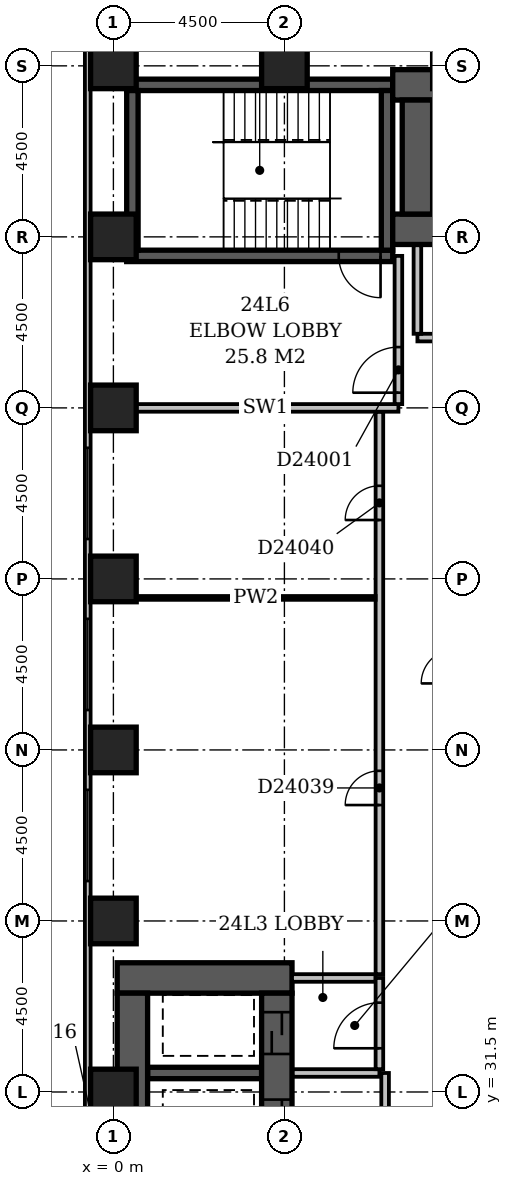
"""IFC4 building model, lengths in metres.
Left out: names, types, materials, properties, quantities, classifications, styles, units other than length and angle.
Written with IfcOpenShell. Run it as: python <this file> out.ifc"""

import sys

from ifc_helpers import new_model, si_unit, direction, frame, frame_2d, origin, origin_2d, place, context, subcontext, project, spatial, rectangle, extrude, element, fill, save


model = new_model("IFC4")
c1 = context("Model", 3, precision=1e-05, world=origin(), true_north=direction((0.0, 1.0)))
c2 = subcontext(c1, "Body", "Model", "MODEL_VIEW")
j1 = project(units=[si_unit("LENGTHUNIT", "METRE"), si_unit("PLANEANGLEUNIT", "RADIAN")], contexts=[c1])
p1 = place(None, origin())
s1 = spatial("IfcSite", under=j1, at=p1, CompositionType="ELEMENT")
p2 = place(p1, origin())
s2 = spatial("IfcBuilding", under=s1, at=p2, CompositionType="ELEMENT")
p3 = place(p2, frame((0.0, 0.0, 97.4)))
s3 = spatial("IfcBuildingStorey", under=s2, at=p3, CompositionType="ELEMENT", Elevation=97.4)
p4 = place(p3, frame((0.1, 34.5, -0.3), z_axis=(0.0, 0.0, 1.0), x_axis=(1.0, 0.0, 0.0)))
e1 = element("IfcWall", 1, at=p4, inside=s3, PredefinedType="SHEAR", context=c2, shape_type="SweptSolid", body=[
    extrude(rectangle(XDim=4.6, YDim=0.8, at=frame_2d((2.3, 0.0))), origin(), (0.0, 0.0, 1.0), 3.6),
])
p5 = place(p3, frame((0.35, 53.5, -0.3), z_axis=(0.0, 0.0, 1.0), x_axis=(1.0, 0.0, 0.0)))
e2 = element("IfcWall", 2, at=p5, inside=s3, PredefinedType="SHEAR", context=c2, shape_type="SweptSolid", body=[
    extrude(rectangle(XDim=7.0, YDim=0.3, at=frame_2d((3.5, 0.0))), origin(), (0.0, 0.0, 1.0), 3.6),
])
p6 = place(p5, frame((5.58, 0.0, 0.3)))
e3 = element("IfcOpeningElement", 3, at=p6, cuts=e2, PredefinedType="OPENING", context=c2, shape_type="SweptSolid", body=[
    extrude(rectangle(XDim=1.1, YDim=2.1, at=frame_2d((0.55, 1.05))), frame((0.0, 0.162, 0.0), z_axis=(0.0, -1.0, 0.0), x_axis=(1.0, 0.0, 0.0)), (0.0, 0.0, 1.0), 0.324),
])
p7 = place(p3, frame((0.35, 58.0, -0.3), z_axis=(0.0, 0.0, 1.0), x_axis=(1.0, 0.0, 0.0)))
e4 = element("IfcWall", 4, at=p7, inside=s3, PredefinedType="SHEAR", context=c2, shape_type="SweptSolid", body=[
    extrude(rectangle(XDim=7.0, YDim=0.3, at=frame_2d((3.5, 0.0))), origin(), (0.0, 0.0, 1.0), 3.6),
])
p8 = place(p3, frame((0.5, 27.15, -0.3), z_axis=(0.0, 0.0, 1.0), x_axis=(0.0, 1.0, 0.0)))
e5 = element("IfcWall", 5, at=p8, inside=s3, PredefinedType="SHEAR", context=c2, shape_type="SweptSolid", body=[
    extrude(rectangle(XDim=6.95, YDim=0.8, at=frame_2d((3.475, 0.0))), origin(), (0.0, 0.0, 1.0), 3.6),
])
p9 = place(p3, frame((0.5, 53.65, -0.3), z_axis=(0.0, 0.0, 1.0), x_axis=(0.0, 1.0, 0.0)))
e6 = element("IfcWall", 6, at=p9, inside=s3, PredefinedType="SHEAR", context=c2, shape_type="SweptSolid", body=[
    extrude(rectangle(XDim=4.2, YDim=0.3, at=frame_2d((2.1, 0.0))), origin(), (0.0, 0.0, 1.0), 3.6),
])
p10 = place(p3, frame((0.9, 32.0, -0.3), z_axis=(0.0, 0.0, 1.0), x_axis=(1.0, 0.0, 0.0)))
e7 = element("IfcWall", 7, at=p10, inside=s3, PredefinedType="SHEAR", context=c2, shape_type="SweptSolid", body=[
    extrude(rectangle(XDim=3.0, YDim=0.3, at=frame_2d((1.5, 0.0))), origin(), (0.0, 0.0, 1.0), 3.6),
])
p11 = place(p3, frame((4.3, 27.15, -0.3), z_axis=(0.0, 0.0, 1.0), x_axis=(0.0, 1.0, 0.0)))
e8 = element("IfcWall", 8, at=p11, inside=s3, PredefinedType="SHEAR", context=c2, shape_type="SweptSolid", body=[
    extrude(rectangle(XDim=6.95, YDim=0.8, at=frame_2d((3.475, 0.0))), origin(), (0.0, 0.0, 1.0), 3.6),
])
p12 = place(p11, frame((3.05, 0.0, 0.3)))
e9 = element("IfcOpeningElement", 9, at=p12, cuts=e8, PredefinedType="OPENING", context=c2, shape_type="SweptSolid", body=[
    extrude(rectangle(XDim=1.1, YDim=2.1, at=frame_2d((0.55, 1.05))), frame((0.0, 0.412, 0.0), z_axis=(0.0, -1.0, 0.0), x_axis=(1.0, 0.0, 0.0)), (0.0, 0.0, 1.0), 0.824),
])
p13 = place(p11, frame((0.55, 0.0, 0.3)))
e10 = element("IfcOpeningElement", 10, at=p13, cuts=e8, PredefinedType="OPENING", context=c2, shape_type="SweptSolid", body=[
    extrude(rectangle(XDim=1.1, YDim=2.1, at=frame_2d((0.55, 1.05))), frame((0.0, 0.412, 0.0), z_axis=(0.0, -1.0, 0.0), x_axis=(1.0, 0.0, 0.0)), (0.0, 0.0, 1.0), 0.824),
])
p14 = place(p11, frame((5.35, 0.0, 0.3)))
e11 = element("IfcOpeningElement", 11, at=p14, cuts=e8, PredefinedType="OPENING", context=c2, shape_type="SweptSolid", body=[
    extrude(rectangle(XDim=1.1, YDim=2.1, at=frame_2d((0.55, 1.05))), frame((0.0, 0.412, 0.0), z_axis=(0.0, -1.0, 0.0), x_axis=(1.0, 0.0, 0.0)), (0.0, 0.0, 1.0), 0.824),
])
p15 = place(p3, frame((7.2, 53.65, -0.3), z_axis=(0.0, 0.0, 1.0), x_axis=(0.0, 1.0, 0.0)))
e12 = element("IfcWall", 12, at=p15, inside=s3, PredefinedType="SHEAR", context=c2, shape_type="SweptSolid", body=[
    extrude(rectangle(XDim=4.2, YDim=0.3, at=frame_2d((2.1, 0.0))), origin(), (0.0, 0.0, 1.0), 3.6),
])
p16 = place(p3, frame((7.35, 54.2, -0.3), z_axis=(0.0, 0.0, 1.0), x_axis=(1.0, 0.0, 0.0)))
e13 = element("IfcWall", 13, at=p16, inside=s3, PredefinedType="SHEAR", context=c2, shape_type="SweptSolid", body=[
    extrude(rectangle(XDim=16.45, YDim=0.8, at=frame_2d((8.225, 0.0))), origin(), (0.0, 0.0, 1.0), 3.6),
])
p17 = place(p16, frame((1.35, 0.0, 0.3)))
e14 = element("IfcOpeningElement", 14, at=p17, cuts=e13, PredefinedType="OPENING", context=c2, shape_type="SweptSolid", body=[
    extrude(rectangle(XDim=1.1, YDim=2.1, at=frame_2d((0.55, 1.05))), frame((0.0, 0.412, 0.0), z_axis=(0.0, -1.0, 0.0), x_axis=(1.0, 0.0, 0.0)), (0.0, 0.0, 1.0), 0.824),
])
p18 = place(p16, frame((3.85, 0.0, 0.3)))
e15 = element("IfcOpeningElement", 15, at=p18, cuts=e13, PredefinedType="OPENING", context=c2, shape_type="SweptSolid", body=[
    extrude(rectangle(XDim=1.1, YDim=2.1, at=frame_2d((0.55, 1.05))), frame((0.0, 0.412, 0.0), z_axis=(0.0, -1.0, 0.0), x_axis=(1.0, 0.0, 0.0)), (0.0, 0.0, 1.0), 0.824),
])
p19 = place(p16, frame((6.35, 0.0, 0.3)))
e16 = element("IfcOpeningElement", 16, at=p19, cuts=e13, PredefinedType="OPENING", context=c2, shape_type="SweptSolid", body=[
    extrude(rectangle(XDim=1.1, YDim=2.1, at=frame_2d((0.55, 1.05))), frame((0.0, 0.412, 0.0), z_axis=(0.0, -1.0, 0.0), x_axis=(1.0, 0.0, 0.0)), (0.0, 0.0, 1.0), 0.824),
])
p20 = place(p16, frame((8.85, 0.0, 0.3)))
e17 = element("IfcOpeningElement", 17, at=p20, cuts=e13, PredefinedType="OPENING", context=c2, shape_type="SweptSolid", body=[
    extrude(rectangle(XDim=1.1, YDim=2.1, at=frame_2d((0.55, 1.05))), frame((0.0, 0.412, 0.0), z_axis=(0.0, -1.0, 0.0), x_axis=(1.0, 0.0, 0.0)), (0.0, 0.0, 1.0), 0.824),
])
p21 = place(p16, frame((11.35, 0.0, 0.3)))
e18 = element("IfcOpeningElement", 18, at=p21, cuts=e13, PredefinedType="OPENING", context=c2, shape_type="SweptSolid", body=[
    extrude(rectangle(XDim=1.1, YDim=2.1, at=frame_2d((0.55, 1.05))), frame((0.0, 0.412, 0.0), z_axis=(0.0, -1.0, 0.0), x_axis=(1.0, 0.0, 0.0)), (0.0, 0.0, 1.0), 0.824),
])
p22 = place(p16, frame((13.85, 0.0, 0.3)))
e19 = element("IfcOpeningElement", 19, at=p22, cuts=e13, PredefinedType="OPENING", context=c2, shape_type="SweptSolid", body=[
    extrude(rectangle(XDim=1.1, YDim=2.1, at=frame_2d((0.55, 1.05))), frame((0.0, 0.412, 0.0), z_axis=(0.0, -1.0, 0.0), x_axis=(1.0, 0.0, 0.0)), (0.0, 0.0, 1.0), 0.824),
])
p23 = place(p3, frame((7.35, 58.0, -0.3), z_axis=(0.0, 0.0, 1.0), x_axis=(1.0, 0.0, 0.0)))
e20 = element("IfcWall", 20, at=p23, inside=s3, PredefinedType="SHEAR", context=c2, shape_type="SweptSolid", body=[
    extrude(rectangle(XDim=16.45, YDim=0.8, at=frame_2d((8.225, 0.0))), origin(), (0.0, 0.0, 1.0), 3.6),
])
p24 = place(p3, frame((8.0, 54.6, -0.3), z_axis=(0.0, 0.0, 1.0), x_axis=(0.0, 1.0, 0.0)))
e21 = element("IfcWall", 21, at=p24, inside=s3, PredefinedType="SHEAR", context=c2, shape_type="SweptSolid", body=[
    extrude(rectangle(XDim=3.0, YDim=0.8, at=frame_2d((1.5, 0.0))), origin(), (0.0, 0.0, 1.0), 3.6),
])
for number, where, z_axis, x_axis in (
    (22, (0.0, 31.5, -0.3), (0.0, 0.0, 1.0), (1.0, 0.0, 0.0)),
    (23, (0.0, 36.0, -0.3), (0.0, 0.0, 1.0), (1.0, 0.0, 0.0)),
    (24, (0.0, 40.5, -0.3), (0.0, 0.0, 1.0), (1.0, 0.0, 0.0)),
    (25, (0.0, 45.0, -0.3), (0.0, 0.0, 1.0), (1.0, 0.0, 0.0)),
    (26, (0.0, 49.5, -0.3), (0.0, 0.0, 1.0), (1.0, 0.0, 0.0)),
    (27, (0.0, 54.0, -0.3), (0.0, 0.0, 1.0), (1.0, 0.0, 0.0)),
    (28, (0.0, 58.5, -0.3), (0.0, 0.0, 1.0), (1.0, 0.0, 0.0)),
    (29, (4.5, 58.5, -0.3), (0.0, 0.0, 1.0), (1.0, 0.0, 0.0)),
):
    element("IfcColumn", number, at=place(p3, frame(where, z_axis=z_axis, x_axis=x_axis)), inside=s3, PredefinedType="COLUMN", context=c2, shape_type="SweptSolid", body=[
        extrude(rectangle(XDim=1.2, YDim=1.2, at=origin_2d()), origin(), (0.0, 0.0, 1.0), 3.6),
    ])
p25 = place(p3, frame((-0.675, 59.1, 0.0), z_axis=(0.0, 0.0, 1.0), x_axis=(0.0, -1.0, 0.0)))
e30 = element("IfcWall", 30, at=p25, inside=s3, PredefinedType="STANDARD", context=c2, shape_type="SweptSolid", body=[
    extrude(rectangle(XDim=55.35, YDim=0.15, at=frame_2d((27.675, 0.0))), origin(), (0.0, 0.0, 1.0), 2.7),
])
p26 = place(p25, frame((10.65, 0.0, 0.6)))
e31 = element("IfcOpeningElement", 31, at=p26, cuts=e30, PredefinedType="OPENING", context=c2, shape_type="SweptSolid", body=[
    extrude(rectangle(XDim=2.4, YDim=1.8, at=frame_2d((1.2, 0.9))), frame((0.0, 0.087, 0.0), z_axis=(0.0, -1.0, 0.0), x_axis=(1.0, 0.0, 0.0)), (0.0, 0.0, 1.0), 0.174),
])
p27 = place(p25, frame((15.15, 0.0, 0.6)))
e32 = element("IfcOpeningElement", 32, at=p27, cuts=e30, PredefinedType="OPENING", context=c2, shape_type="SweptSolid", body=[
    extrude(rectangle(XDim=2.4, YDim=1.8, at=frame_2d((1.2, 0.9))), frame((0.0, 0.087, 0.0), z_axis=(0.0, -1.0, 0.0), x_axis=(1.0, 0.0, 0.0)), (0.0, 0.0, 1.0), 0.174),
])
p28 = place(p25, frame((19.65, 0.0, 0.6)))
e33 = element("IfcOpeningElement", 33, at=p28, cuts=e30, PredefinedType="OPENING", context=c2, shape_type="SweptSolid", body=[
    extrude(rectangle(XDim=2.4, YDim=1.8, at=frame_2d((1.2, 0.9))), frame((0.0, 0.087, 0.0), z_axis=(0.0, -1.0, 0.0), x_axis=(1.0, 0.0, 0.0)), (0.0, 0.0, 1.0), 0.174),
])
p29 = place(p25, frame((42.15, 0.0, 0.6)))
e34 = element("IfcOpeningElement", 34, at=p29, cuts=e30, PredefinedType="OPENING", context=c2, shape_type="SweptSolid", body=[
    extrude(rectangle(XDim=2.4, YDim=1.8, at=frame_2d((1.2, 0.9))), frame((0.0, 0.087, 0.0), z_axis=(0.0, -1.0, 0.0), x_axis=(1.0, 0.0, 0.0)), (0.0, 0.0, 1.0), 0.174),
])
p30 = place(p3, frame((8.0, 51.35, 0.0), z_axis=(0.0, 0.0, 1.0), x_axis=(1.0, 0.0, 0.0)))
e35 = element("IfcWall", 35, at=p30, inside=s3, PredefinedType="PARTITIONING", context=c2, shape_type="SweptSolid", body=[
    extrude(rectangle(XDim=15.0, YDim=0.2, at=frame_2d((7.5, 0.0))), origin(), (0.0, 0.0, 1.0), 3.3),
])
p31 = place(p30, frame((3.4, 0.0, 0.0)))
e36 = element("IfcOpeningElement", 36, at=p31, cuts=e35, PredefinedType="OPENING", context=c2, shape_type="SweptSolid", body=[
    extrude(rectangle(XDim=1.2, YDim=2.1, at=frame_2d((0.6, 1.05))), frame((0.0, 0.112, 0.0), z_axis=(0.0, -1.0, 0.0), x_axis=(1.0, 0.0, 0.0)), (0.0, 0.0, 1.0), 0.224),
])
p32 = place(p30, frame((9.4, 0.0, 0.0)))
e37 = element("IfcOpeningElement", 37, at=p32, cuts=e35, PredefinedType="OPENING", context=c2, shape_type="SweptSolid", body=[
    extrude(rectangle(XDim=1.2, YDim=2.1, at=frame_2d((0.6, 1.05))), frame((0.0, 0.112, 0.0), z_axis=(0.0, -1.0, 0.0), x_axis=(1.0, 0.0, 0.0)), (0.0, 0.0, 1.0), 0.224),
])
p33 = place(p3, frame((8.0, 51.45, 0.0), z_axis=(0.0, 0.0, 1.0), x_axis=(0.0, 1.0, 0.0)))
e38 = element("IfcWall", 38, at=p33, inside=s3, PredefinedType="PARTITIONING", context=c2, shape_type="SweptSolid", body=[
    extrude(rectangle(XDim=2.33, YDim=0.2, at=frame_2d((1.165, 0.0))), origin(), (0.0, 0.0, 1.0), 3.3),
])
p34 = place(p3, frame((4.72, 32.0, 0.0), z_axis=(0.0, 0.0, 1.0), x_axis=(1.0, 0.0, 0.0)))
e39 = element("IfcWall", 39, at=p34, inside=s3, PredefinedType="PARTITIONING", context=c2, shape_type="SweptSolid", body=[
    extrude(rectangle(XDim=2.28, YDim=0.2, at=frame_2d((1.14, 0.0))), origin(), (0.0, 0.0, 1.0), 3.3),
])
p35 = place(p3, frame((7.0, 32.1, 0.0), z_axis=(0.0, 0.0, 1.0), x_axis=(0.0, 1.0, 0.0)))
e40 = element("IfcWall", 40, at=p35, inside=s3, PredefinedType="PARTITIONING", context=c2, shape_type="SweptSolid", body=[
    extrude(rectangle(XDim=2.4, YDim=0.2, at=frame_2d((1.2, 0.0))), origin(), (0.0, 0.0, 1.0), 3.3),
])
p36 = place(p35, frame((0.55, 0.0, 0.0)))
e41 = element("IfcOpeningElement", 41, at=p36, cuts=e40, PredefinedType="OPENING", context=c2, shape_type="SweptSolid", body=[
    extrude(rectangle(XDim=1.2, YDim=2.1, at=frame_2d((0.6, 1.05))), frame((0.0, 0.112, 0.0), z_axis=(0.0, -1.0, 0.0), x_axis=(1.0, 0.0, 0.0)), (0.0, 0.0, 1.0), 0.224),
])
p37 = place(p3, frame((4.7, 34.5, 0.0), z_axis=(0.0, 0.0, 1.0), x_axis=(1.0, 0.0, 0.0)))
e42 = element("IfcWall", 42, at=p37, inside=s3, PredefinedType="PARTITIONING", context=c2, shape_type="SweptSolid", body=[
    extrude(rectangle(XDim=2.2, YDim=0.2, at=frame_2d((1.1, 0.0))), origin(), (0.0, 0.0, 1.0), 3.3),
])
p38 = place(p3, frame((7.15, 27.17, 0.0), z_axis=(0.0, 0.0, 1.0), x_axis=(0.0, 1.0, 0.0)))
e43 = element("IfcWall", 43, at=p38, inside=s3, PredefinedType="PARTITIONING", context=c2, shape_type="SweptSolid", body=[
    extrude(rectangle(XDim=4.83, YDim=0.2, at=frame_2d((2.415, 0.0))), origin(), (0.0, 0.0, 1.0), 3.3),
])
p39 = place(p38, frame((1.73, 0.0, 0.0)))
e44 = element("IfcOpeningElement", 44, at=p39, cuts=e43, PredefinedType="OPENING", context=c2, shape_type="SweptSolid", body=[
    extrude(rectangle(XDim=1.2, YDim=2.1, at=frame_2d((0.6, 1.05))), frame((0.0, 0.112, 0.0), z_axis=(0.0, -1.0, 0.0), x_axis=(1.0, 0.0, 0.0)), (0.0, 0.0, 1.0), 0.224),
])
p40 = place(p3, frame((0.5, 49.5, 0.0), z_axis=(0.0, 0.0, 1.0), x_axis=(1.0, 0.0, 0.0)))
e45 = element("IfcWall", 45, at=p40, inside=s3, PredefinedType="PARTITIONING", context=c2, shape_type="SweptSolid", body=[
    extrude(rectangle(XDim=7.0, YDim=0.2, at=frame_2d((3.5, 0.0))), origin(), (0.0, 0.0, 1.0), 3.3),
])
p41 = place(p3, frame((7.5, 49.6, 0.0), z_axis=(0.0, 0.0, 1.0), x_axis=(0.0, 1.0, 0.0)))
e46 = element("IfcWall", 46, at=p41, inside=s3, PredefinedType="PARTITIONING", context=c2, shape_type="SweptSolid", body=[
    extrude(rectangle(XDim=3.9, YDim=0.2, at=frame_2d((1.95, 0.0))), origin(), (0.0, 0.0, 1.0), 3.3),
])
p42 = place(p41, frame((0.3, 0.0, 0.0)))
e47 = element("IfcOpeningElement", 47, at=p42, cuts=e46, PredefinedType="OPENING", context=c2, shape_type="SweptSolid", body=[
    extrude(rectangle(XDim=1.2, YDim=2.1, at=frame_2d((0.6, 1.05))), frame((0.0, 0.112, 0.0), z_axis=(0.0, -1.0, 0.0), x_axis=(1.0, 0.0, 0.0)), (0.0, 0.0, 1.0), 0.224),
])
p43 = place(p3, frame((7.0, 34.6, 0.0), z_axis=(0.0, 0.0, 1.0), x_axis=(0.0, 1.0, 0.0)))
e48 = element("IfcWall", 48, at=p43, inside=s3, PredefinedType="PARTITIONING", context=c2, shape_type="SweptSolid", body=[
    extrude(rectangle(XDim=14.8, YDim=0.2, at=frame_2d((7.4, 0.0))), origin(), (0.0, 0.0, 1.0), 3.3),
])
p44 = place(p43, frame((4.45, 0.0, 0.0)))
e49 = element("IfcOpeningElement", 49, at=p44, cuts=e48, PredefinedType="OPENING", context=c2, shape_type="SweptSolid", body=[
    extrude(rectangle(XDim=0.9, YDim=2.1, at=frame_2d((0.45, 1.05))), frame((0.0, 0.112, 0.0), z_axis=(0.0, -1.0, 0.0), x_axis=(1.0, 0.0, 0.0)), (0.0, 0.0, 1.0), 0.224),
])
p45 = place(p43, frame((11.95, 0.0, 0.0)))
e50 = element("IfcOpeningElement", 50, at=p45, cuts=e48, PredefinedType="OPENING", context=c2, shape_type="SweptSolid", body=[
    extrude(rectangle(XDim=0.9, YDim=2.1, at=frame_2d((0.45, 1.05))), frame((0.0, 0.112, 0.0), z_axis=(0.0, -1.0, 0.0), x_axis=(1.0, 0.0, 0.0)), (0.0, 0.0, 1.0), 0.224),
])
p46 = place(p3, frame((0.6, 44.5, 0.0), z_axis=(0.0, 0.0, 1.0), x_axis=(1.0, 0.0, 0.0)))
e51 = element("IfcWall", 51, at=p46, inside=s3, PredefinedType="PARTITIONING", context=c2, shape_type="SweptSolid", body=[
    extrude(rectangle(XDim=6.3, YDim=0.1, at=frame_2d((3.15, 0.0))), origin(), (0.0, 0.0, 1.0), 3.3),
])
p47 = place(p26, origin())
e52 = element("IfcWindow", 52, at=p47, inside=s3, PartitioningType="SINGLE_PANEL", PredefinedType="WINDOW", context=c2, shape_type="SweptSolid", body=[
    extrude(rectangle(XDim=2.4, YDim=1.8, at=frame_2d((1.2, 0.9))), frame((0.0, 0.03, 0.0), z_axis=(0.0, -1.0, 0.0), x_axis=(1.0, 0.0, 0.0)), (0.0, 0.0, 1.0), 0.06),
])
fill(e31, e52)
p48 = place(p27, origin())
e53 = element("IfcWindow", 53, at=p48, inside=s3, PartitioningType="SINGLE_PANEL", PredefinedType="WINDOW", context=c2, shape_type="SweptSolid", body=[
    extrude(rectangle(XDim=2.4, YDim=1.8, at=frame_2d((1.2, 0.9))), frame((0.0, 0.03, 0.0), z_axis=(0.0, -1.0, 0.0), x_axis=(1.0, 0.0, 0.0)), (0.0, 0.0, 1.0), 0.06),
])
fill(e32, e53)
p49 = place(p28, origin())
e54 = element("IfcWindow", 54, at=p49, inside=s3, PartitioningType="SINGLE_PANEL", PredefinedType="WINDOW", context=c2, shape_type="SweptSolid", body=[
    extrude(rectangle(XDim=2.4, YDim=1.8, at=frame_2d((1.2, 0.9))), frame((0.0, 0.03, 0.0), z_axis=(0.0, -1.0, 0.0), x_axis=(1.0, 0.0, 0.0)), (0.0, 0.0, 1.0), 0.06),
])
fill(e33, e54)
p50 = place(p42, origin())
e55 = element("IfcDoor", 55, at=p50, inside=s3, OperationType="SINGLE_SWING_LEFT", PredefinedType="DOOR", context=c2, shape_type="SweptSolid", body=[
    extrude(rectangle(XDim=1.2, YDim=2.1, at=frame_2d((0.6, 1.05))), frame((0.0, 0.025, 0.0), z_axis=(0.0, -1.0, 0.0), x_axis=(1.0, 0.0, 0.0)), (0.0, 0.0, 1.0), 0.05),
])
fill(e47, e55)
p51 = place(p12, origin())
e56 = element("IfcDoor", 56, at=p51, inside=s3, OperationType="SLIDING_TO_LEFT", PredefinedType="DOOR", context=c2, shape_type="SweptSolid", body=[
    extrude(rectangle(XDim=1.1, YDim=2.1, at=frame_2d((0.55, 1.05))), frame((0.0, 0.025, 0.0), z_axis=(0.0, -1.0, 0.0), x_axis=(1.0, 0.0, 0.0)), (0.0, 0.0, 1.0), 0.05),
])
fill(e9, e56)
p52 = place(p36, origin())
e57 = element("IfcDoor", 57, at=p52, inside=s3, OperationType="SINGLE_SWING_LEFT", PredefinedType="DOOR", context=c2, shape_type="SweptSolid", body=[
    extrude(rectangle(XDim=1.2, YDim=2.1, at=frame_2d((0.6, 1.05))), frame((0.0, 0.025, 0.0), z_axis=(0.0, -1.0, 0.0), x_axis=(1.0, 0.0, 0.0)), (0.0, 0.0, 1.0), 0.05),
])
fill(e41, e57)
p53 = place(p14, origin())
e58 = element("IfcDoor", 58, at=p53, inside=s3, OperationType="SLIDING_TO_LEFT", PredefinedType="DOOR", context=c2, shape_type="SweptSolid", body=[
    extrude(rectangle(XDim=1.1, YDim=2.1, at=frame_2d((0.55, 1.05))), frame((0.0, 0.025, 0.0), z_axis=(0.0, -1.0, 0.0), x_axis=(1.0, 0.0, 0.0)), (0.0, 0.0, 1.0), 0.05),
])
fill(e11, e58)
p54 = place(p6, origin())
e59 = element("IfcDoor", 59, at=p54, inside=s3, OperationType="SINGLE_SWING_RIGHT", PredefinedType="DOOR", context=c2, shape_type="SweptSolid", body=[
    extrude(rectangle(XDim=1.1, YDim=2.1, at=frame_2d((0.55, 1.05))), frame((0.0, 0.025, 0.0), z_axis=(0.0, -1.0, 0.0), x_axis=(1.0, 0.0, 0.0)), (0.0, 0.0, 1.0), 0.05),
])
fill(e3, e59)
p55 = place(p44, origin())
e60 = element("IfcDoor", 60, at=p55, inside=s3, OperationType="SINGLE_SWING_LEFT", PredefinedType="DOOR", context=c2, shape_type="SweptSolid", body=[
    extrude(rectangle(XDim=0.9, YDim=2.1, at=frame_2d((0.45, 1.05))), frame((0.0, 0.025, 0.0), z_axis=(0.0, -1.0, 0.0), x_axis=(1.0, 0.0, 0.0)), (0.0, 0.0, 1.0), 0.05),
])
fill(e49, e60)
p56 = place(p45, origin())
e61 = element("IfcDoor", 61, at=p56, inside=s3, OperationType="SINGLE_SWING_LEFT", PredefinedType="DOOR", context=c2, shape_type="SweptSolid", body=[
    extrude(rectangle(XDim=0.9, YDim=2.1, at=frame_2d((0.45, 1.05))), frame((0.0, 0.025, 0.0), z_axis=(0.0, -1.0, 0.0), x_axis=(1.0, 0.0, 0.0)), (0.0, 0.0, 1.0), 0.05),
])
fill(e50, e61)
save(model, sys.argv[1])
